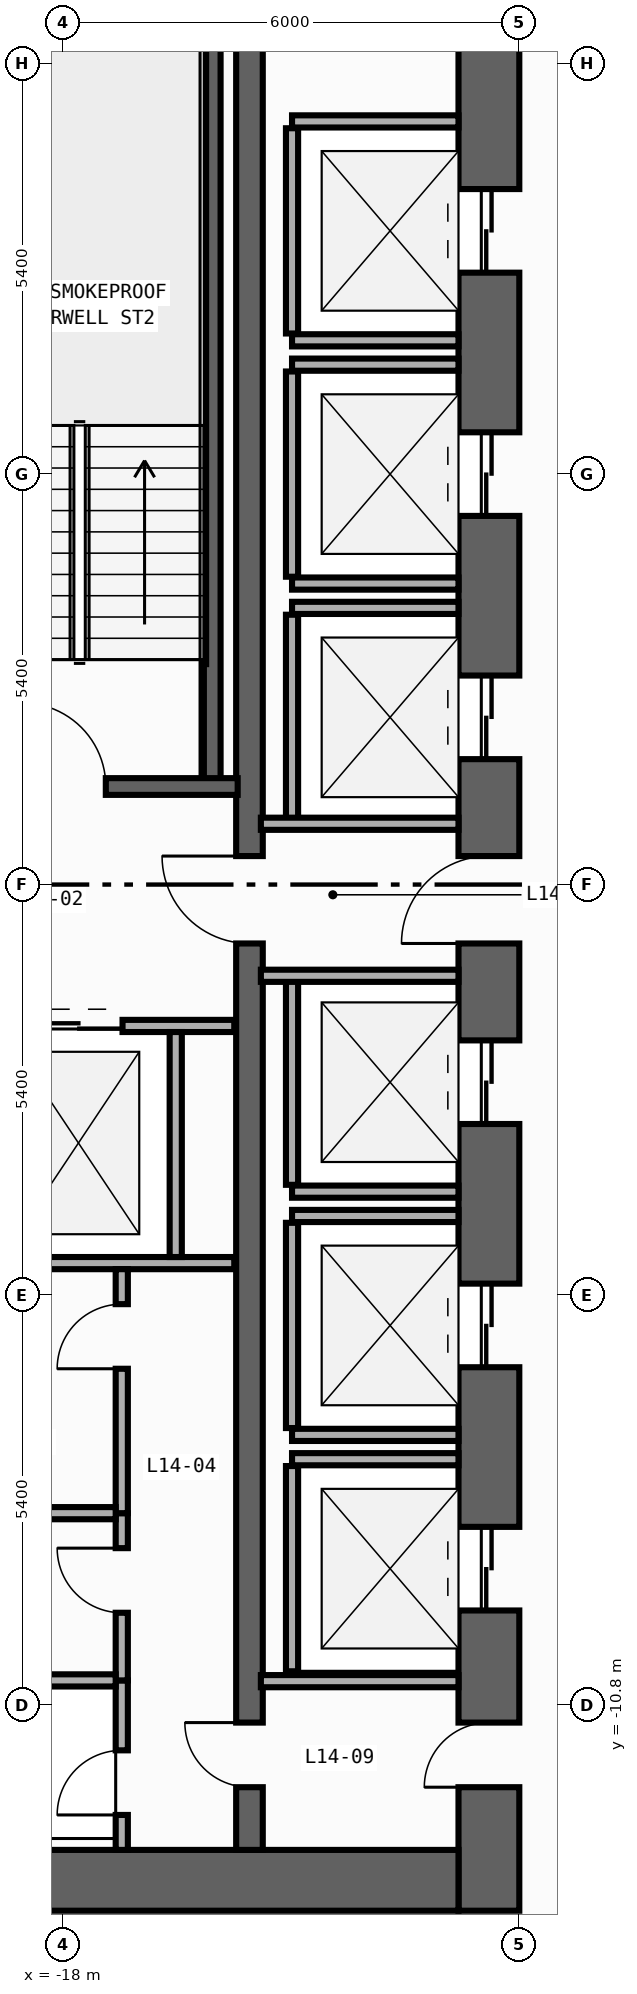
"""IFC4 building model, lengths in metres.
Left out: names, types, materials, properties, quantities, classifications, styles, units other than length and angle.
Written with IfcOpenShell. Run it as: python <this file> out.ifc"""

import sys

from ifc_helpers import new_model, si_unit, direction, frame, frame_2d, origin, place, context, subcontext, project, spatial, rectangle, extrude, element, fill, save


model = new_model("IFC4")
c1 = context("Model", 3, precision=1e-05, world=origin(), true_north=direction((0.0, 1.0)))
c2 = subcontext(c1, "Body", "Model", "MODEL_VIEW")
j1 = project(units=[si_unit("LENGTHUNIT", "METRE"), si_unit("PLANEANGLEUNIT", "RADIAN")], contexts=[c1])
p1 = place(None, origin())
s1 = spatial("IfcSite", under=j1, at=p1, CompositionType="ELEMENT")
p2 = place(p1, origin())
s2 = spatial("IfcBuilding", under=s1, at=p2, CompositionType="ELEMENT")
p3 = place(p2, frame((0.0, 0.0, 59.6)))
s3 = spatial("IfcBuildingStorey", under=s2, at=p3, CompositionType="ELEMENT", Elevation=59.6)
p4 = place(p3, frame((-12.4, -13.5, 0.0), z_axis=(0.0, 0.0, 1.0), x_axis=(0.0, 1.0, 0.0)))
e1 = element("IfcWall", 1, at=p4, inside=s3, PredefinedType="SHEAR", context=c2, shape_type="SweptSolid", body=[
    extrude(rectangle(XDim=27.0, YDim=0.8, at=frame_2d((13.5, 0.0))), origin(), (0.0, 0.0, 1.0), 3.94),
])
p5 = place(p4, frame((21.55, 0.0, 0.0)))
e2 = element("IfcOpeningElement", 2, at=p5, cuts=e1, PredefinedType="OPENING", context=c2, shape_type="SweptSolid", body=[
    extrude(rectangle(XDim=1.1, YDim=2.2, at=frame_2d((0.55, 1.1))), frame((0.0, 0.41, 0.0), z_axis=(0.0, -1.0, 0.0), x_axis=(1.0, 0.0, 0.0)), (0.0, 0.0, 1.0), 0.82),
])
p6 = place(p4, frame((18.35, 0.0, 0.0)))
e3 = element("IfcOpeningElement", 3, at=p6, cuts=e1, PredefinedType="OPENING", context=c2, shape_type="SweptSolid", body=[
    extrude(rectangle(XDim=1.1, YDim=2.2, at=frame_2d((0.55, 1.1))), frame((0.0, 0.41, 0.0), z_axis=(0.0, -1.0, 0.0), x_axis=(1.0, 0.0, 0.0)), (0.0, 0.0, 1.0), 0.82),
])
p7 = place(p4, frame((15.15, 0.0, 0.0)))
e4 = element("IfcOpeningElement", 4, at=p7, cuts=e1, PredefinedType="OPENING", context=c2, shape_type="SweptSolid", body=[
    extrude(rectangle(XDim=1.1, YDim=2.2, at=frame_2d((0.55, 1.1))), frame((0.0, 0.41, 0.0), z_axis=(0.0, -1.0, 0.0), x_axis=(1.0, 0.0, 0.0)), (0.0, 0.0, 1.0), 0.82),
])
p8 = place(p4, frame((10.35, 0.0, 0.0)))
e5 = element("IfcOpeningElement", 5, at=p8, cuts=e1, PredefinedType="OPENING", context=c2, shape_type="SweptSolid", body=[
    extrude(rectangle(XDim=1.1, YDim=2.2, at=frame_2d((0.55, 1.1))), frame((0.0, 0.41, 0.0), z_axis=(0.0, -1.0, 0.0), x_axis=(1.0, 0.0, 0.0)), (0.0, 0.0, 1.0), 0.82),
])
p9 = place(p4, frame((7.15, 0.0, 0.0)))
e6 = element("IfcOpeningElement", 6, at=p9, cuts=e1, PredefinedType="OPENING", context=c2, shape_type="SweptSolid", body=[
    extrude(rectangle(XDim=1.1, YDim=2.2, at=frame_2d((0.55, 1.1))), frame((0.0, 0.41, 0.0), z_axis=(0.0, -1.0, 0.0), x_axis=(1.0, 0.0, 0.0)), (0.0, 0.0, 1.0), 0.82),
])
p10 = place(p4, frame((3.95, 0.0, 0.0)))
e7 = element("IfcOpeningElement", 7, at=p10, cuts=e1, PredefinedType="OPENING", context=c2, shape_type="SweptSolid", body=[
    extrude(rectangle(XDim=1.1, YDim=2.2, at=frame_2d((0.55, 1.1))), frame((0.0, 0.41, 0.0), z_axis=(0.0, -1.0, 0.0), x_axis=(1.0, 0.0, 0.0)), (0.0, 0.0, 1.0), 0.82),
])
p11 = place(p4, frame((12.725, 0.0, 0.0)))
e8 = element("IfcOpeningElement", 8, at=p11, cuts=e1, PredefinedType="OPENING", context=c2, shape_type="SweptSolid", body=[
    extrude(rectangle(XDim=1.15, YDim=2.2, at=frame_2d((0.575, 1.1))), frame((0.0, 0.41, 0.0), z_axis=(0.0, -1.0, 0.0), x_axis=(1.0, 0.0, 0.0)), (0.0, 0.0, 1.0), 0.82),
])
p12 = place(p4, frame((1.625, 0.0, 0.0)))
e9 = element("IfcOpeningElement", 9, at=p12, cuts=e1, PredefinedType="OPENING", context=c2, shape_type="SweptSolid", body=[
    extrude(rectangle(XDim=0.85, YDim=2.1, at=frame_2d((0.425, 1.05))), frame((0.0, 0.41, 0.0), z_axis=(0.0, -1.0, 0.0), x_axis=(1.0, 0.0, 0.0)), (0.0, 0.0, 1.0), 0.82),
])
p13 = place(p3, frame((-19.6, -13.1, 0.0), z_axis=(0.0, 0.0, 1.0), x_axis=(1.0, 0.0, 0.0)))
e10 = element("IfcWall", 10, at=p13, inside=s3, PredefinedType="SHEAR", context=c2, shape_type="SweptSolid", body=[
    extrude(rectangle(XDim=6.8, YDim=0.8, at=frame_2d((3.4, 0.0))), origin(), (0.0, 0.0, 1.0), 3.94),
])
p14 = place(p3, frame((-15.55, -12.7, 0.0), z_axis=(0.0, 0.0, 1.0), x_axis=(0.0, 1.0, 0.0)))
e11 = element("IfcWall", 11, at=p14, inside=s3, PredefinedType="SHEAR", context=c2, shape_type="SweptSolid", body=[
    extrude(rectangle(XDim=25.4, YDim=0.35, at=frame_2d((12.7, 0.0))), origin(), (0.0, 0.0, 1.0), 3.94),
])
p15 = place(p14, frame((11.925, 0.0, 0.0)))
e12 = element("IfcOpeningElement", 12, at=p15, cuts=e11, PredefinedType="OPENING", context=c2, shape_type="SweptSolid", body=[
    extrude(rectangle(XDim=1.15, YDim=2.2, at=frame_2d((0.575, 1.1))), frame((0.0, 0.185, 0.0), z_axis=(0.0, -1.0, 0.0), x_axis=(1.0, 0.0, 0.0)), (0.0, 0.0, 1.0), 0.37),
])
p16 = place(p14, frame((0.825, 0.0, 0.0)))
e13 = element("IfcOpeningElement", 13, at=p16, cuts=e11, PredefinedType="OPENING", context=c2, shape_type="SweptSolid", body=[
    extrude(rectangle(XDim=0.85, YDim=2.1, at=frame_2d((0.425, 1.05))), frame((0.0, 0.185, 0.0), z_axis=(0.0, -1.0, 0.0), x_axis=(1.0, 0.0, 0.0)), (0.0, 0.0, 1.0), 0.37),
])
p17 = place(p3, frame((-16.04, 1.29, 0.0), z_axis=(0.0, 0.0, 1.0), x_axis=(0.0, 1.0, 0.0)))
e14 = element("IfcWall", 14, at=p17, inside=s3, PredefinedType="SHEAR", context=c2, shape_type="SweptSolid", body=[
    extrude(rectangle(XDim=11.3, YDim=0.22, at=frame_2d((5.65, 0.0))), origin(), (0.0, 0.0, 1.0), 3.94),
])
p18 = place(p3, frame((-19.62, 1.29, 0.0), z_axis=(0.0, 0.0, 1.0), x_axis=(1.0, 0.0, 0.0)))
e15 = element("IfcWall", 15, at=p18, inside=s3, PredefinedType="SHEAR", context=c2, shape_type="SweptSolid", body=[
    extrude(rectangle(XDim=3.915, YDim=0.22, at=frame_2d((1.958, 0.0))), origin(), (0.0, 0.0, 1.0), 3.94),
])
p19 = place(p18, frame((1.08, 0.0, 0.0)))
e16 = element("IfcOpeningElement", 16, at=p19, cuts=e15, PredefinedType="OPENING", context=c2, shape_type="SweptSolid", body=[
    extrude(rectangle(XDim=1.1, YDim=2.2, at=frame_2d((0.55, 1.1))), frame((0.0, 0.12, 0.0), z_axis=(0.0, -1.0, 0.0), x_axis=(1.0, 0.0, 0.0)), (0.0, 0.0, 1.0), 0.24),
])
for number, where, z_axis, x_axis in (
    (17, (-14.99, 7.16, 0.0), (0.0, 0.0, 1.0), (1.0, 0.0, 0.0)),
    (18, (-14.99, 10.04, 0.0), (0.0, 0.0, 1.0), (1.0, 0.0, 0.0)),
):
    element("IfcWall", number, at=place(p3, frame(where, z_axis=z_axis, x_axis=x_axis)), inside=s3, PredefinedType="STANDARD", context=c2, shape_type="SweptSolid", body=[
        extrude(rectangle(XDim=2.19, YDim=0.16, at=frame_2d((1.095, 0.0))), origin(), (0.0, 0.0, 1.0), 3.94),
    ])
p20 = place(p3, frame((-14.99, 7.25, 0.0), z_axis=(0.0, 0.0, 1.0), x_axis=(0.0, 1.0, 0.0)))
e19 = element("IfcWall", 19, at=p20, inside=s3, PredefinedType="STANDARD", context=c2, shape_type="SweptSolid", body=[
    extrude(rectangle(XDim=2.7, YDim=0.16, at=frame_2d((1.35, 0.0))), origin(), (0.0, 0.0, 1.0), 3.94),
])
for number, where, z_axis, x_axis in (
    (20, (-14.99, 3.96, 0.0), (0.0, 0.0, 1.0), (1.0, 0.0, 0.0)),
    (21, (-14.99, 6.84, 0.0), (0.0, 0.0, 1.0), (1.0, 0.0, 0.0)),
):
    element("IfcWall", number, at=place(p3, frame(where, z_axis=z_axis, x_axis=x_axis)), inside=s3, PredefinedType="STANDARD", context=c2, shape_type="SweptSolid", body=[
        extrude(rectangle(XDim=2.19, YDim=0.16, at=frame_2d((1.095, 0.0))), origin(), (0.0, 0.0, 1.0), 3.94),
    ])
p21 = place(p3, frame((-14.99, 4.05, 0.0), z_axis=(0.0, 0.0, 1.0), x_axis=(0.0, 1.0, 0.0)))
e22 = element("IfcWall", 22, at=p21, inside=s3, PredefinedType="STANDARD", context=c2, shape_type="SweptSolid", body=[
    extrude(rectangle(XDim=2.7, YDim=0.16, at=frame_2d((1.35, 0.0))), origin(), (0.0, 0.0, 1.0), 3.94),
])
p22 = place(p3, frame((-14.99, 3.64, 0.0), z_axis=(0.0, 0.0, 1.0), x_axis=(1.0, 0.0, 0.0)))
e23 = element("IfcWall", 23, at=p22, inside=s3, PredefinedType="STANDARD", context=c2, shape_type="SweptSolid", body=[
    extrude(rectangle(XDim=2.19, YDim=0.16, at=frame_2d((1.095, 0.0))), origin(), (0.0, 0.0, 1.0), 3.94),
])
p23 = place(p3, frame((-14.99, 0.85, 0.0), z_axis=(0.0, 0.0, 1.0), x_axis=(0.0, 1.0, 0.0)))
e24 = element("IfcWall", 24, at=p23, inside=s3, PredefinedType="STANDARD", context=c2, shape_type="SweptSolid", body=[
    extrude(rectangle(XDim=2.7, YDim=0.16, at=frame_2d((1.35, 0.0))), origin(), (0.0, 0.0, 1.0), 3.94),
])
p24 = place(p3, frame((-14.99, -4.04, 0.0), z_axis=(0.0, 0.0, 1.0), x_axis=(1.0, 0.0, 0.0)))
e25 = element("IfcWall", 25, at=p24, inside=s3, PredefinedType="STANDARD", context=c2, shape_type="SweptSolid", body=[
    extrude(rectangle(XDim=2.19, YDim=0.16, at=frame_2d((1.095, 0.0))), origin(), (0.0, 0.0, 1.0), 3.94),
])
p25 = place(p3, frame((-14.99, -3.95, 0.0), z_axis=(0.0, 0.0, 1.0), x_axis=(0.0, 1.0, 0.0)))
e26 = element("IfcWall", 26, at=p25, inside=s3, PredefinedType="STANDARD", context=c2, shape_type="SweptSolid", body=[
    extrude(rectangle(XDim=2.7, YDim=0.16, at=frame_2d((1.35, 0.0))), origin(), (0.0, 0.0, 1.0), 3.94),
])
for number, where, z_axis, x_axis in (
    (27, (-14.99, -7.24, 0.0), (0.0, 0.0, 1.0), (1.0, 0.0, 0.0)),
    (28, (-14.99, -4.36, 0.0), (0.0, 0.0, 1.0), (1.0, 0.0, 0.0)),
):
    element("IfcWall", number, at=place(p3, frame(where, z_axis=z_axis, x_axis=x_axis)), inside=s3, PredefinedType="STANDARD", context=c2, shape_type="SweptSolid", body=[
        extrude(rectangle(XDim=2.19, YDim=0.16, at=frame_2d((1.095, 0.0))), origin(), (0.0, 0.0, 1.0), 3.94),
    ])
p26 = place(p3, frame((-14.99, -7.15, 0.0), z_axis=(0.0, 0.0, 1.0), x_axis=(0.0, 1.0, 0.0)))
e29 = element("IfcWall", 29, at=p26, inside=s3, PredefinedType="STANDARD", context=c2, shape_type="SweptSolid", body=[
    extrude(rectangle(XDim=2.7, YDim=0.16, at=frame_2d((1.35, 0.0))), origin(), (0.0, 0.0, 1.0), 3.94),
])
p27 = place(p3, frame((-14.99, -7.56, 0.0), z_axis=(0.0, 0.0, 1.0), x_axis=(1.0, 0.0, 0.0)))
e30 = element("IfcWall", 30, at=p27, inside=s3, PredefinedType="STANDARD", context=c2, shape_type="SweptSolid", body=[
    extrude(rectangle(XDim=2.19, YDim=0.16, at=frame_2d((1.095, 0.0))), origin(), (0.0, 0.0, 1.0), 3.94),
])
p28 = place(p3, frame((-14.99, -10.35, 0.0), z_axis=(0.0, 0.0, 1.0), x_axis=(0.0, 1.0, 0.0)))
e31 = element("IfcWall", 31, at=p28, inside=s3, PredefinedType="STANDARD", context=c2, shape_type="SweptSolid", body=[
    extrude(rectangle(XDim=2.7, YDim=0.16, at=frame_2d((1.35, 0.0))), origin(), (0.0, 0.0, 1.0), 3.94),
])
p29 = place(p3, frame((-19.55, -1.86, 0.0), z_axis=(0.0, 0.0, 1.0), x_axis=(1.0, 0.0, 0.0)))
e32 = element("IfcWall", 32, at=p29, inside=s3, PredefinedType="STANDARD", context=c2, shape_type="SweptSolid", body=[
    extrude(rectangle(XDim=3.8, YDim=0.16, at=frame_2d((1.9, 0.0))), origin(), (0.0, 0.0, 1.0), 3.94),
])
p30 = place(p29, frame((1.18, 0.0, 0.0)))
e33 = element("IfcOpeningElement", 33, at=p30, cuts=e32, PredefinedType="OPENING", context=c2, shape_type="SweptSolid", body=[
    extrude(rectangle(XDim=1.15, YDim=2.2, at=frame_2d((0.575, 1.1))), frame((0.0, 0.09, 0.0), z_axis=(0.0, -1.0, 0.0), x_axis=(1.0, 0.0, 0.0)), (0.0, 0.0, 1.0), 0.18),
])
p31 = place(p3, frame((-19.55, -4.98, 0.0), z_axis=(0.0, 0.0, 1.0), x_axis=(1.0, 0.0, 0.0)))
e34 = element("IfcWall", 34, at=p31, inside=s3, PredefinedType="STANDARD", context=c2, shape_type="SweptSolid", body=[
    extrude(rectangle(XDim=3.8, YDim=0.16, at=frame_2d((1.9, 0.0))), origin(), (0.0, 0.0, 1.0), 3.94),
])
p32 = place(p3, frame((-16.52, -4.9, 0.0), z_axis=(0.0, 0.0, 1.0), x_axis=(0.0, 1.0, 0.0)))
e35 = element("IfcWall", 35, at=p32, inside=s3, PredefinedType="STANDARD", context=c2, shape_type="SweptSolid", body=[
    extrude(rectangle(XDim=2.96, YDim=0.16, at=frame_2d((1.48, 0.0))), origin(), (0.0, 0.0, 1.0), 3.94),
])
for number, where, z_axis, x_axis in (
    (36, (-15.4, 0.8, 0.0), (0.0, 0.0, 1.0), (1.0, 0.0, 0.0)),
    (37, (-15.4, -1.2, 0.0), (0.0, 0.0, 1.0), (1.0, 0.0, 0.0)),
    (38, (-15.4, -10.48, 0.0), (0.0, 0.0, 1.0), (1.0, 0.0, 0.0)),
):
    element("IfcWall", number, at=place(p3, frame(where, z_axis=z_axis, x_axis=x_axis)), inside=s3, PredefinedType="STANDARD", context=c2, shape_type="SweptSolid", body=[
        extrude(rectangle(XDim=2.6, YDim=0.16, at=frame_2d((1.3, 0.0))), origin(), (0.0, 0.0, 1.0), 3.94),
    ])
p33 = place(p3, frame((-17.23, -12.7, 0.0), z_axis=(0.0, 0.0, 1.0), x_axis=(0.0, 1.0, 0.0)))
e39 = element("IfcWall", 39, at=p33, inside=s3, PredefinedType="PARTITIONING", context=c2, shape_type="SweptSolid", body=[
    extrude(rectangle(XDim=2.23, YDim=0.16, at=frame_2d((1.115, 0.0))), origin(), (0.0, 0.0, 1.0), 3.94),
])
p34 = place(p33, frame((0.46, 0.0, 0.0)))
e40 = element("IfcOpeningElement", 40, at=p34, cuts=e39, PredefinedType="OPENING", context=c2, shape_type="SweptSolid", body=[
    extrude(rectangle(XDim=0.85, YDim=2.1, at=frame_2d((0.425, 1.05))), frame((0.0, 0.09, 0.0), z_axis=(0.0, -1.0, 0.0), x_axis=(1.0, 0.0, 0.0)), (0.0, 0.0, 1.0), 0.18),
])
p35 = place(p3, frame((-17.23, -10.47, 0.0), z_axis=(0.0, 0.0, 1.0), x_axis=(0.0, 1.0, 0.0)))
e41 = element("IfcWall", 41, at=p35, inside=s3, PredefinedType="PARTITIONING", context=c2, shape_type="SweptSolid", body=[
    extrude(rectangle(XDim=2.2, YDim=0.16, at=frame_2d((1.1, 0.0))), origin(), (0.0, 0.0, 1.0), 3.94),
])
p36 = place(p35, frame((0.89, 0.0, 0.0)))
e42 = element("IfcOpeningElement", 42, at=p36, cuts=e41, PredefinedType="OPENING", context=c2, shape_type="SweptSolid", body=[
    extrude(rectangle(XDim=0.85, YDim=2.1, at=frame_2d((0.425, 1.05))), frame((0.0, 0.09, 0.0), z_axis=(0.0, -1.0, 0.0), x_axis=(1.0, 0.0, 0.0)), (0.0, 0.0, 1.0), 0.18),
])
p37 = place(p3, frame((-17.23, -8.27, 0.0), z_axis=(0.0, 0.0, 1.0), x_axis=(0.0, 1.0, 0.0)))
e43 = element("IfcWall", 43, at=p37, inside=s3, PredefinedType="PARTITIONING", context=c2, shape_type="SweptSolid", body=[
    extrude(rectangle(XDim=3.21, YDim=0.16, at=frame_2d((1.605, 0.0))), origin(), (0.0, 0.0, 1.0), 3.94),
])
p38 = place(p37, frame((1.9, 0.0, 0.0)))
e44 = element("IfcOpeningElement", 44, at=p38, cuts=e43, PredefinedType="OPENING", context=c2, shape_type="SweptSolid", body=[
    extrude(rectangle(XDim=0.85, YDim=2.1, at=frame_2d((0.425, 1.05))), frame((0.0, 0.09, 0.0), z_axis=(0.0, -1.0, 0.0), x_axis=(1.0, 0.0, 0.0)), (0.0, 0.0, 1.0), 0.18),
])
for number, where, z_axis, x_axis in (
    (45, (-19.6, -10.47, 0.0), (0.0, 0.0, 1.0), (1.0, 0.0, 0.0)),
    (46, (-19.6, -8.27, 0.0), (0.0, 0.0, 1.0), (1.0, 0.0, 0.0)),
):
    element("IfcWall", number, at=place(p3, frame(where, z_axis=z_axis, x_axis=x_axis)), inside=s3, PredefinedType="PARTITIONING", context=c2, shape_type="SweptSolid", body=[
        extrude(rectangle(XDim=2.29, YDim=0.16, at=frame_2d((1.145, 0.0))), origin(), (0.0, 0.0, 1.0), 3.94),
    ])
p39 = place(p19, origin())
e47 = element("IfcDoor", 47, at=p39, inside=s3, OperationType="SINGLE_SWING_LEFT", PredefinedType="DOOR", context=c2, shape_type="SweptSolid", body=[
    extrude(rectangle(XDim=1.1, YDim=2.2, at=frame_2d((0.55, 1.1))), frame((0.0, 0.025, 0.0), z_axis=(0.0, -1.0, 0.0), x_axis=(1.0, 0.0, 0.0)), (0.0, 0.0, 1.0), 0.05),
])
fill(e16, e47)
p40 = place(p5, origin())
e48 = element("IfcDoor", 48, at=p40, inside=s3, OperationType="DOUBLE_DOOR_SLIDING", PredefinedType="DOOR", context=c2, shape_type="SweptSolid", body=[
    extrude(rectangle(XDim=1.1, YDim=2.2, at=frame_2d((0.55, 1.1))), frame((0.0, 0.025, 0.0), z_axis=(0.0, -1.0, 0.0), x_axis=(1.0, 0.0, 0.0)), (0.0, 0.0, 1.0), 0.05),
])
fill(e2, e48)
p41 = place(p6, origin())
e49 = element("IfcDoor", 49, at=p41, inside=s3, OperationType="DOUBLE_DOOR_SLIDING", PredefinedType="DOOR", context=c2, shape_type="SweptSolid", body=[
    extrude(rectangle(XDim=1.1, YDim=2.2, at=frame_2d((0.55, 1.1))), frame((0.0, 0.025, 0.0), z_axis=(0.0, -1.0, 0.0), x_axis=(1.0, 0.0, 0.0)), (0.0, 0.0, 1.0), 0.05),
])
fill(e3, e49)
p42 = place(p7, origin())
e50 = element("IfcDoor", 50, at=p42, inside=s3, OperationType="DOUBLE_DOOR_SLIDING", PredefinedType="DOOR", context=c2, shape_type="SweptSolid", body=[
    extrude(rectangle(XDim=1.1, YDim=2.2, at=frame_2d((0.55, 1.1))), frame((0.0, 0.025, 0.0), z_axis=(0.0, -1.0, 0.0), x_axis=(1.0, 0.0, 0.0)), (0.0, 0.0, 1.0), 0.05),
])
fill(e4, e50)
p43 = place(p8, origin())
e51 = element("IfcDoor", 51, at=p43, inside=s3, OperationType="DOUBLE_DOOR_SLIDING", PredefinedType="DOOR", context=c2, shape_type="SweptSolid", body=[
    extrude(rectangle(XDim=1.1, YDim=2.2, at=frame_2d((0.55, 1.1))), frame((0.0, 0.025, 0.0), z_axis=(0.0, -1.0, 0.0), x_axis=(1.0, 0.0, 0.0)), (0.0, 0.0, 1.0), 0.05),
])
fill(e5, e51)
p44 = place(p9, origin())
e52 = element("IfcDoor", 52, at=p44, inside=s3, OperationType="DOUBLE_DOOR_SLIDING", PredefinedType="DOOR", context=c2, shape_type="SweptSolid", body=[
    extrude(rectangle(XDim=1.1, YDim=2.2, at=frame_2d((0.55, 1.1))), frame((0.0, 0.025, 0.0), z_axis=(0.0, -1.0, 0.0), x_axis=(1.0, 0.0, 0.0)), (0.0, 0.0, 1.0), 0.05),
])
fill(e6, e52)
p45 = place(p10, origin())
e53 = element("IfcDoor", 53, at=p45, inside=s3, OperationType="DOUBLE_DOOR_SLIDING", PredefinedType="DOOR", context=c2, shape_type="SweptSolid", body=[
    extrude(rectangle(XDim=1.1, YDim=2.2, at=frame_2d((0.55, 1.1))), frame((0.0, 0.025, 0.0), z_axis=(0.0, -1.0, 0.0), x_axis=(1.0, 0.0, 0.0)), (0.0, 0.0, 1.0), 0.05),
])
fill(e7, e53)
p46 = place(p11, origin())
e54 = element("IfcDoor", 54, at=p46, inside=s3, OperationType="SINGLE_SWING_LEFT", PredefinedType="DOOR", context=c2, shape_type="SweptSolid", body=[
    extrude(rectangle(XDim=1.15, YDim=2.2, at=frame_2d((0.575, 1.1))), frame((0.0, 0.025, 0.0), z_axis=(0.0, -1.0, 0.0), x_axis=(1.0, 0.0, 0.0)), (0.0, 0.0, 1.0), 0.05),
])
fill(e8, e54)
p47 = place(p15, origin())
e55 = element("IfcDoor", 55, at=p47, inside=s3, OperationType="SINGLE_SWING_RIGHT", PredefinedType="DOOR", context=c2, shape_type="SweptSolid", body=[
    extrude(rectangle(XDim=1.15, YDim=2.2, at=frame_2d((0.575, 1.1))), frame((0.0, 0.025, 0.0), z_axis=(0.0, -1.0, 0.0), x_axis=(1.0, 0.0, 0.0)), (0.0, 0.0, 1.0), 0.05),
])
fill(e12, e55)
p48 = place(p12, origin())
e56 = element("IfcDoor", 56, at=p48, inside=s3, OperationType="SINGLE_SWING_LEFT", PredefinedType="DOOR", context=c2, shape_type="SweptSolid", body=[
    extrude(rectangle(XDim=0.85, YDim=2.1, at=frame_2d((0.425, 1.05))), frame((0.0, 0.025, 0.0), z_axis=(0.0, -1.0, 0.0), x_axis=(1.0, 0.0, 0.0)), (0.0, 0.0, 1.0), 0.05),
])
fill(e9, e56)
p49 = place(p16, origin())
e57 = element("IfcDoor", 57, at=p49, inside=s3, OperationType="SINGLE_SWING_RIGHT", PredefinedType="DOOR", context=c2, shape_type="SweptSolid", body=[
    extrude(rectangle(XDim=0.85, YDim=2.1, at=frame_2d((0.425, 1.05))), frame((0.0, 0.025, 0.0), z_axis=(0.0, -1.0, 0.0), x_axis=(1.0, 0.0, 0.0)), (0.0, 0.0, 1.0), 0.05),
])
fill(e13, e57)
p50 = place(p30, origin())
e58 = element("IfcDoor", 58, at=p50, inside=s3, OperationType="DOUBLE_DOOR_SLIDING", PredefinedType="DOOR", context=c2, shape_type="SweptSolid", body=[
    extrude(rectangle(XDim=1.15, YDim=2.2, at=frame_2d((0.575, 1.1))), frame((0.0, 0.025, 0.0), z_axis=(0.0, -1.0, 0.0), x_axis=(1.0, 0.0, 0.0)), (0.0, 0.0, 1.0), 0.05),
])
fill(e33, e58)
p51 = place(p34, origin())
e59 = element("IfcDoor", 59, at=p51, inside=s3, OperationType="SINGLE_SWING_LEFT", PredefinedType="DOOR", context=c2, shape_type="SweptSolid", body=[
    extrude(rectangle(XDim=0.85, YDim=2.1, at=frame_2d((0.425, 1.05))), frame((0.0, 0.025, 0.0), z_axis=(0.0, -1.0, 0.0), x_axis=(1.0, 0.0, 0.0)), (0.0, 0.0, 1.0), 0.05),
])
fill(e40, e59)
p52 = place(p36, origin())
e60 = element("IfcDoor", 60, at=p52, inside=s3, OperationType="SINGLE_SWING_RIGHT", PredefinedType="DOOR", context=c2, shape_type="SweptSolid", body=[
    extrude(rectangle(XDim=0.85, YDim=2.1, at=frame_2d((0.425, 1.05))), frame((0.0, 0.025, 0.0), z_axis=(0.0, -1.0, 0.0), x_axis=(1.0, 0.0, 0.0)), (0.0, 0.0, 1.0), 0.05),
])
fill(e42, e60)
p53 = place(p38, origin())
e61 = element("IfcDoor", 61, at=p53, inside=s3, OperationType="SINGLE_SWING_LEFT", PredefinedType="DOOR", context=c2, shape_type="SweptSolid", body=[
    extrude(rectangle(XDim=0.85, YDim=2.1, at=frame_2d((0.425, 1.05))), frame((0.0, 0.025, 0.0), z_axis=(0.0, -1.0, 0.0), x_axis=(1.0, 0.0, 0.0)), (0.0, 0.0, 1.0), 0.05),
])
fill(e44, e61)
save(model, sys.argv[1])
